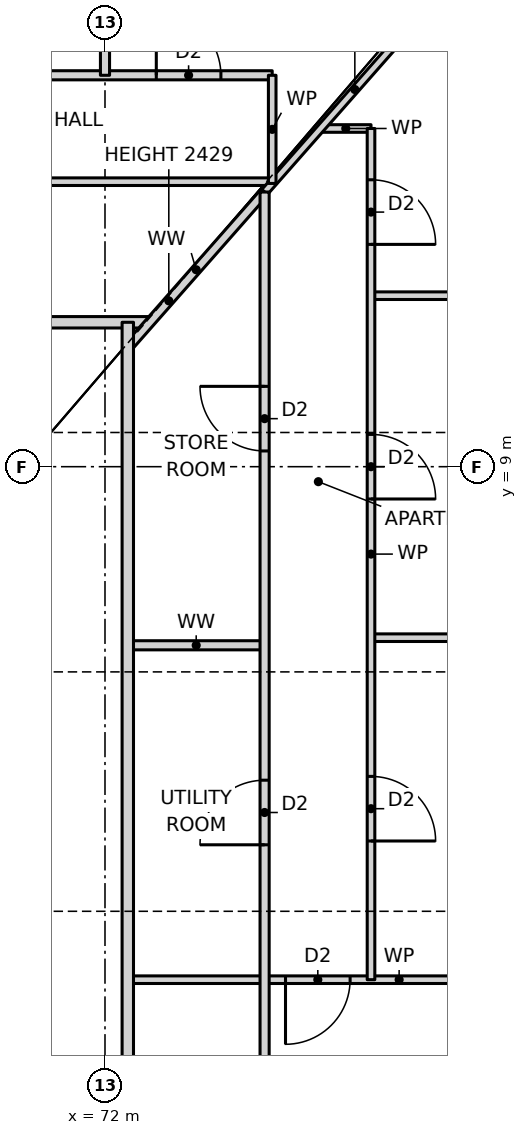
"""IFC4 building model, lengths in metres.
Left out: names, types, materials, properties, quantities, classifications, styles, units other than length and angle.
Written with IfcOpenShell. Run it as: python <this file> out.ifc"""

import sys

from ifc_helpers import new_model, si_unit, direction, frame, frame_2d, origin, place, context, subcontext, project, spatial, rectangle, extrude, element, fill, save


model = new_model("IFC4")
c1 = context("Model", 3, precision=1e-05, world=origin(), true_north=direction((0.0, 1.0)))
c2 = subcontext(c1, "Body", "Model", "MODEL_VIEW")
j1 = project(units=[si_unit("LENGTHUNIT", "METRE"), si_unit("PLANEANGLEUNIT", "RADIAN")], contexts=[c1])
p1 = place(None, origin())
s1 = spatial("IfcSite", under=j1, at=p1, CompositionType="ELEMENT")
p2 = place(p1, origin())
s2 = spatial("IfcBuilding", under=s1, at=p2, CompositionType="ELEMENT")
p3 = place(p2, frame((0.0, 0.0, 39.5)))
s3 = spatial("IfcBuildingStorey", under=s2, at=p3, CompositionType="ELEMENT", Elevation=39.5)
p4 = place(p3, frame((72.3, 2.25, 0.0), z_axis=(0.0, 0.0, 1.0), x_axis=(1.0, 0.0, 0.0)))
e1 = element("IfcWall", 1, at=p4, inside=s3, PredefinedType="PARTITIONING", context=c2, shape_type="SweptSolid", body=[
    extrude(rectangle(XDim=7.14, YDim=0.1, at=frame_2d((3.57, 0.0))), origin(), (0.0, 0.0, 1.0), 3.27),
])
p5 = place(p4, frame((2.075, 0.0, 0.0)))
e2 = element("IfcOpeningElement", 2, at=p5, cuts=e1, PredefinedType="OPENING", context=c2, shape_type="SweptSolid", body=[
    extrude(rectangle(XDim=0.85, YDim=2.1, at=frame_2d((0.425, 1.05))), frame((0.0, 0.06, 0.0), z_axis=(0.0, -1.0, 0.0), x_axis=(1.0, 0.0, 0.0)), (0.0, 0.0, 1.0), 0.12),
])
p6 = place(p3, frame((72.3, 6.65, 0.0), z_axis=(0.0, 0.0, 1.0), x_axis=(1.0, 0.0, 0.0)))
e3 = element("IfcWall", 3, at=p6, inside=s3, PredefinedType="PARTITIONING", context=c2, shape_type="SweptSolid", body=[
    extrude(rectangle(XDim=1.8, YDim=0.12, at=frame_2d((0.9, 0.0))), origin(), (0.0, 0.0, 1.0), 3.27),
])
p7 = place(p3, frame((75.5, 6.75, 0.0), z_axis=(0.0, 0.0, 1.0), x_axis=(1.0, 0.0, 0.0)))
e4 = element("IfcWall", 4, at=p7, inside=s3, PredefinedType="PARTITIONING", context=c2, shape_type="SweptSolid", body=[
    extrude(rectangle(XDim=3.94, YDim=0.1, at=frame_2d((1.97, 0.0))), origin(), (0.0, 0.0, 1.0), 3.27),
])
p8 = place(p3, frame((53.408, 10.9, 0.0), z_axis=(0.0, 0.0, 1.0), x_axis=(1.0, 0.0, 0.0)))
e5 = element("IfcWall", 5, at=p8, inside=s3, PredefinedType="PARTITIONING", context=c2, shape_type="SweptSolid", body=[
    extrude(rectangle(XDim=19.184, YDim=0.15, at=frame_2d((9.592, 0.0))), origin(), (0.0, 0.0, 1.0), 3.27),
])
p9 = place(p8, frame((8.592, 0.0, 0.0)))
e6 = element("IfcOpeningElement", 6, at=p9, cuts=e5, PredefinedType="OPENING", context=c2, shape_type="SweptSolid", body=[
    extrude(rectangle(XDim=1.0, YDim=2.1, at=frame_2d((0.5, 1.05))), frame((0.0, 0.085, 0.0), z_axis=(0.0, -1.0, 0.0), x_axis=(1.0, 0.0, 0.0)), (0.0, 0.0, 1.0), 0.17),
])
p10 = place(p3, frame((75.5, 11.25, 0.0), z_axis=(0.0, 0.0, 1.0), x_axis=(1.0, 0.0, 0.0)))
e7 = element("IfcWall", 7, at=p10, inside=s3, PredefinedType="PARTITIONING", context=c2, shape_type="SweptSolid", body=[
    extrude(rectangle(XDim=3.94, YDim=0.1, at=frame_2d((1.97, 0.0))), origin(), (0.0, 0.0, 1.0), 3.27),
])
p11 = place(p3, frame((51.8, 12.75, 0.0), z_axis=(0.0, 0.0, 1.0), x_axis=(1.0, 0.0, 0.0)))
e8 = element("IfcWall", 8, at=p11, inside=s3, PredefinedType="PARTITIONING", context=c2, shape_type="SweptSolid", body=[
    extrude(rectangle(XDim=22.4, YDim=0.1, at=frame_2d((11.2, 0.0))), origin(), (0.0, 0.0, 1.0), 3.27),
])
p12 = place(p11, frame((13.475, 0.0, 0.0)))
e9 = element("IfcOpeningElement", 9, at=p12, cuts=e8, PredefinedType="OPENING", context=c2, shape_type="SweptSolid", body=[
    extrude(rectangle(XDim=0.85, YDim=2.1, at=frame_2d((0.425, 1.05))), frame((0.0, 0.06, 0.0), z_axis=(0.0, -1.0, 0.0), x_axis=(1.0, 0.0, 0.0)), (0.0, 0.0, 1.0), 0.12),
])
p13 = place(p11, frame((10.275, 0.0, 0.0)))
e10 = element("IfcOpeningElement", 10, at=p13, cuts=e8, PredefinedType="OPENING", context=c2, shape_type="SweptSolid", body=[
    extrude(rectangle(XDim=0.85, YDim=2.1, at=frame_2d((0.425, 1.05))), frame((0.0, 0.06, 0.0), z_axis=(0.0, -1.0, 0.0), x_axis=(1.0, 0.0, 0.0)), (0.0, 0.0, 1.0), 0.12),
])
p14 = place(p11, frame((18.625, 0.0, 0.0)))
e11 = element("IfcOpeningElement", 11, at=p14, cuts=e8, PredefinedType="OPENING", context=c2, shape_type="SweptSolid", body=[
    extrude(rectangle(XDim=0.85, YDim=2.1, at=frame_2d((0.425, 1.05))), frame((0.0, 0.06, 0.0), z_axis=(0.0, -1.0, 0.0), x_axis=(1.0, 0.0, 0.0)), (0.0, 0.0, 1.0), 0.12),
])
p15 = place(p11, frame((2.925, 0.0, 0.0)))
e12 = element("IfcOpeningElement", 12, at=p15, cuts=e8, PredefinedType="OPENING", context=c2, shape_type="SweptSolid", body=[
    extrude(rectangle(XDim=0.85, YDim=2.1, at=frame_2d((0.425, 1.05))), frame((0.0, 0.06, 0.0), z_axis=(0.0, -1.0, 0.0), x_axis=(1.0, 0.0, 0.0)), (0.0, 0.0, 1.0), 0.12),
])
p16 = place(p3, frame((74.836, 13.45, 0.0), z_axis=(0.0, 0.0, 1.0), x_axis=(1.0, 0.0, 0.0)))
e13 = element("IfcWall", 13, at=p16, inside=s3, PredefinedType="PARTITIONING", context=c2, shape_type="SweptSolid", body=[
    extrude(rectangle(XDim=0.664, YDim=0.1, at=frame_2d((0.332, 0.0))), origin(), (0.0, 0.0, 1.0), 3.27),
])
p17 = place(p3, frame((67.5, 14.15, 0.0), z_axis=(0.0, 0.0, 1.0), x_axis=(1.0, 0.0, 0.0)))
e14 = element("IfcWall", 14, at=p17, inside=s3, PredefinedType="PARTITIONING", context=c2, shape_type="SweptSolid", body=[
    extrude(rectangle(XDim=6.7, YDim=0.12, at=frame_2d((3.35, 0.0))), origin(), (0.0, 0.0, 1.0), 3.27),
])
p18 = place(p17, frame((0.625, 0.0, 0.0)))
e15 = element("IfcOpeningElement", 15, at=p18, cuts=e14, PredefinedType="OPENING", context=c2, shape_type="SweptSolid", body=[
    extrude(rectangle(XDim=0.85, YDim=2.1, at=frame_2d((0.425, 1.05))), frame((0.0, 0.07, 0.0), z_axis=(0.0, -1.0, 0.0), x_axis=(1.0, 0.0, 0.0)), (0.0, 0.0, 1.0), 0.14),
])
p19 = place(p17, frame((5.175, 0.0, 0.0)))
e16 = element("IfcOpeningElement", 16, at=p19, cuts=e14, PredefinedType="OPENING", context=c2, shape_type="SweptSolid", body=[
    extrude(rectangle(XDim=0.85, YDim=2.1, at=frame_2d((0.425, 1.05))), frame((0.0, 0.07, 0.0), z_axis=(0.0, -1.0, 0.0), x_axis=(1.0, 0.0, 0.0)), (0.0, 0.0, 1.0), 0.14),
])
p20 = place(p3, frame((74.1, 12.614, 0.0), z_axis=(0.0, 0.0, 1.0), x_axis=(0.660755619739, 0.750601099775, 0.0)))
e17 = element("IfcWall", 17, at=p20, inside=s3, PredefinedType="PARTITIONING", context=c2, shape_type="SweptSolid", body=[
    extrude(rectangle(XDim=5.989, YDim=0.1, at=frame_2d((2.995, 0.0))), origin(), (0.0, 0.0, 1.0), 2.429),
])
p21 = place(p3, frame((72.299, 10.569, 0.0), z_axis=(0.0, 0.0, 1.0), x_axis=(0.660797520752, 0.750564212155, 0.0)))
e18 = element("IfcWall", 18, at=p21, inside=s3, PredefinedType="PARTITIONING", context=c2, shape_type="SweptSolid", body=[
    extrude(rectangle(XDim=2.725, YDim=0.12, at=frame_2d((1.363, 0.0))), origin(), (0.0, 0.0, 1.0), 2.429),
])
p22 = place(p3, frame((75.5, 2.25, 0.0), z_axis=(0.0, 0.0, 1.0), x_axis=(0.0, 1.0, 0.0)))
e19 = element("IfcWall", 19, at=p22, inside=s3, PredefinedType="PARTITIONING", context=c2, shape_type="SweptSolid", body=[
    extrude(rectangle(XDim=11.2, YDim=0.1, at=frame_2d((5.6, 0.0))), origin(), (0.0, 0.0, 1.0), 3.27),
])
p23 = place(p22, frame((1.825, 0.0, 0.0)))
e20 = element("IfcOpeningElement", 20, at=p23, cuts=e19, PredefinedType="OPENING", context=c2, shape_type="SweptSolid", body=[
    extrude(rectangle(XDim=0.85, YDim=2.1, at=frame_2d((0.425, 1.05))), frame((0.0, 0.06, 0.0), z_axis=(0.0, -1.0, 0.0), x_axis=(1.0, 0.0, 0.0)), (0.0, 0.0, 1.0), 0.12),
])
p24 = place(p22, frame((6.325, 0.0, 0.0)))
e21 = element("IfcOpeningElement", 21, at=p24, cuts=e19, PredefinedType="OPENING", context=c2, shape_type="SweptSolid", body=[
    extrude(rectangle(XDim=0.85, YDim=2.1, at=frame_2d((0.425, 1.05))), frame((0.0, 0.06, 0.0), z_axis=(0.0, -1.0, 0.0), x_axis=(1.0, 0.0, 0.0)), (0.0, 0.0, 1.0), 0.12),
])
p25 = place(p22, frame((9.675, 0.0, 0.0)))
e22 = element("IfcOpeningElement", 22, at=p25, cuts=e19, PredefinedType="OPENING", context=c2, shape_type="SweptSolid", body=[
    extrude(rectangle(XDim=0.85, YDim=2.1, at=frame_2d((0.425, 1.05))), frame((0.0, 0.06, 0.0), z_axis=(0.0, -1.0, 0.0), x_axis=(1.0, 0.0, 0.0)), (0.0, 0.0, 1.0), 0.12),
])
p26 = place(p3, frame((74.2, 12.727, 0.0), z_axis=(0.0, 0.0, 1.0), x_axis=(0.0, 1.0, 0.0)))
e23 = element("IfcWall", 23, at=p26, inside=s3, PredefinedType="PARTITIONING", context=c2, shape_type="SweptSolid", body=[
    extrude(rectangle(XDim=1.423, YDim=0.1, at=frame_2d((0.711, 0.0))), origin(), (0.0, 0.0, 1.0), 3.27),
])
p27 = place(p3, frame((74.1, -12.614, 0.0), z_axis=(0.0, 0.0, 1.0), x_axis=(0.0, 1.0, 0.0)))
e24 = element("IfcWall", 24, at=p27, inside=s3, PredefinedType="PARTITIONING", context=c2, shape_type="SweptSolid", body=[
    extrude(rectangle(XDim=25.228, YDim=0.12, at=frame_2d((12.614, 0.0))), origin(), (0.0, 0.0, 1.0), 3.27),
])
p28 = place(p27, frame((7.239, 0.0, 0.0)))
e25 = element("IfcOpeningElement", 25, at=p28, cuts=e24, PredefinedType="OPENING", context=c2, shape_type="SweptSolid", body=[
    extrude(rectangle(XDim=0.85, YDim=2.1, at=frame_2d((0.425, 1.05))), frame((0.0, 0.07, 0.0), z_axis=(0.0, -1.0, 0.0), x_axis=(1.0, 0.0, 0.0)), (0.0, 0.0, 1.0), 0.14),
])
p29 = place(p27, frame((10.439, 0.0, 0.0)))
e26 = element("IfcOpeningElement", 26, at=p29, cuts=e24, PredefinedType="OPENING", context=c2, shape_type="SweptSolid", body=[
    extrude(rectangle(XDim=0.85, YDim=2.1, at=frame_2d((0.425, 1.05))), frame((0.0, 0.07, 0.0), z_axis=(0.0, -1.0, 0.0), x_axis=(1.0, 0.0, 0.0)), (0.0, 0.0, 1.0), 0.14),
])
p30 = place(p27, frame((2.507, 0.0, 0.0)))
e27 = element("IfcOpeningElement", 27, at=p30, cuts=e24, PredefinedType="OPENING", context=c2, shape_type="SweptSolid", body=[
    extrude(rectangle(XDim=0.85, YDim=2.1, at=frame_2d((0.425, 1.05))), frame((0.0, 0.07, 0.0), z_axis=(0.0, -1.0, 0.0), x_axis=(1.0, 0.0, 0.0)), (0.0, 0.0, 1.0), 0.14),
])
p31 = place(p27, frame((16.639, 0.0, 0.0)))
e28 = element("IfcOpeningElement", 28, at=p31, cuts=e24, PredefinedType="OPENING", context=c2, shape_type="SweptSolid", body=[
    extrude(rectangle(XDim=0.85, YDim=2.1, at=frame_2d((0.425, 1.05))), frame((0.0, 0.07, 0.0), z_axis=(0.0, -1.0, 0.0), x_axis=(1.0, 0.0, 0.0)), (0.0, 0.0, 1.0), 0.14),
])
p32 = place(p27, frame((21.821, 0.0, 0.0)))
e29 = element("IfcOpeningElement", 29, at=p32, cuts=e24, PredefinedType="OPENING", context=c2, shape_type="SweptSolid", body=[
    extrude(rectangle(XDim=0.85, YDim=2.1, at=frame_2d((0.425, 1.05))), frame((0.0, 0.07, 0.0), z_axis=(0.0, -1.0, 0.0), x_axis=(1.0, 0.0, 0.0)), (0.0, 0.0, 1.0), 0.14),
])
p33 = place(p3, frame((72.3, -10.568, 0.0), z_axis=(0.0, 0.0, 1.0), x_axis=(0.0, 1.0, 0.0)))
e30 = element("IfcWall", 30, at=p33, inside=s3, PredefinedType="PARTITIONING", context=c2, shape_type="SweptSolid", body=[
    extrude(rectangle(XDim=21.468, YDim=0.15, at=frame_2d((10.734, 0.0))), origin(), (0.0, 0.0, 1.0), 3.27),
])
p34 = place(p33, frame((8.318, 0.0, 0.0)))
e31 = element("IfcOpeningElement", 31, at=p34, cuts=e30, PredefinedType="OPENING", context=c2, shape_type="SweptSolid", body=[
    extrude(rectangle(XDim=1.0, YDim=2.1, at=frame_2d((0.5, 1.05))), frame((0.0, 0.085, 0.0), z_axis=(0.0, -1.0, 0.0), x_axis=(1.0, 0.0, 0.0)), (0.0, 0.0, 1.0), 0.17),
])
p35 = place(p3, frame((72.0, 14.15, 0.0), z_axis=(0.0, 0.0, 1.0), x_axis=(0.0, 1.0, 0.0)))
e32 = element("IfcWall", 32, at=p35, inside=s3, PredefinedType="PARTITIONING", context=c2, shape_type="SweptSolid", body=[
    extrude(rectangle(XDim=4.54, YDim=0.12, at=frame_2d((2.27, 0.0))), origin(), (0.0, 0.0, 1.0), 3.27),
])
p36 = place(p5, frame((0.85, 0.0, 0.0), z_axis=(0.0, 0.0, 1.0), x_axis=(-1.0, 0.0, 0.0)))
e33 = element("IfcDoor", 33, at=p36, inside=s3, OperationType="SINGLE_SWING_RIGHT", PredefinedType="DOOR", context=c2, shape_type="SweptSolid", body=[
    extrude(rectangle(XDim=0.85, YDim=2.1, at=frame_2d((0.425, 1.05))), frame((0.0, 0.025, 0.0), z_axis=(0.0, -1.0, 0.0), x_axis=(1.0, 0.0, 0.0)), (0.0, 0.0, 1.0), 0.05),
])
fill(e2, e33)
p37 = place(p23, frame((0.85, 0.0, 0.0), z_axis=(0.0, 0.0, 1.0), x_axis=(-1.0, 0.0, 0.0)))
e34 = element("IfcDoor", 34, at=p37, inside=s3, OperationType="SINGLE_SWING_RIGHT", PredefinedType="DOOR", context=c2, shape_type="SweptSolid", body=[
    extrude(rectangle(XDim=0.85, YDim=2.1, at=frame_2d((0.425, 1.05))), frame((0.0, 0.025, 0.0), z_axis=(0.0, -1.0, 0.0), x_axis=(1.0, 0.0, 0.0)), (0.0, 0.0, 1.0), 0.05),
])
fill(e20, e34)
p38 = place(p24, frame((0.85, 0.0, 0.0), z_axis=(0.0, 0.0, 1.0), x_axis=(-1.0, 0.0, 0.0)))
e35 = element("IfcDoor", 35, at=p38, inside=s3, OperationType="SINGLE_SWING_RIGHT", PredefinedType="DOOR", context=c2, shape_type="SweptSolid", body=[
    extrude(rectangle(XDim=0.85, YDim=2.1, at=frame_2d((0.425, 1.05))), frame((0.0, 0.025, 0.0), z_axis=(0.0, -1.0, 0.0), x_axis=(1.0, 0.0, 0.0)), (0.0, 0.0, 1.0), 0.05),
])
fill(e21, e35)
p39 = place(p25, frame((0.85, 0.0, 0.0), z_axis=(0.0, 0.0, 1.0), x_axis=(-1.0, 0.0, 0.0)))
e36 = element("IfcDoor", 36, at=p39, inside=s3, OperationType="SINGLE_SWING_RIGHT", PredefinedType="DOOR", context=c2, shape_type="SweptSolid", body=[
    extrude(rectangle(XDim=0.85, YDim=2.1, at=frame_2d((0.425, 1.05))), frame((0.0, 0.025, 0.0), z_axis=(0.0, -1.0, 0.0), x_axis=(1.0, 0.0, 0.0)), (0.0, 0.0, 1.0), 0.05),
])
fill(e22, e36)
p40 = place(p31, origin())
e37 = element("IfcDoor", 37, at=p40, inside=s3, OperationType="SINGLE_SWING_LEFT", PredefinedType="DOOR", context=c2, shape_type="SweptSolid", body=[
    extrude(rectangle(XDim=0.85, YDim=2.1, at=frame_2d((0.425, 1.05))), frame((0.0, 0.025, 0.0), z_axis=(0.0, -1.0, 0.0), x_axis=(1.0, 0.0, 0.0)), (0.0, 0.0, 1.0), 0.05),
])
fill(e28, e37)
p41 = place(p32, origin())
e38 = element("IfcDoor", 38, at=p41, inside=s3, OperationType="SINGLE_SWING_RIGHT", PredefinedType="DOOR", context=c2, shape_type="SweptSolid", body=[
    extrude(rectangle(XDim=0.85, YDim=2.1, at=frame_2d((0.425, 1.05))), frame((0.0, 0.025, 0.0), z_axis=(0.0, -1.0, 0.0), x_axis=(1.0, 0.0, 0.0)), (0.0, 0.0, 1.0), 0.05),
])
fill(e29, e38)
p42 = place(p19, origin())
e39 = element("IfcDoor", 39, at=p42, inside=s3, OperationType="SINGLE_SWING_LEFT", PredefinedType="DOOR", context=c2, shape_type="SweptSolid", body=[
    extrude(rectangle(XDim=0.85, YDim=2.1, at=frame_2d((0.425, 1.05))), frame((0.0, 0.025, 0.0), z_axis=(0.0, -1.0, 0.0), x_axis=(1.0, 0.0, 0.0)), (0.0, 0.0, 1.0), 0.05),
])
fill(e16, e39)
save(model, sys.argv[1])
